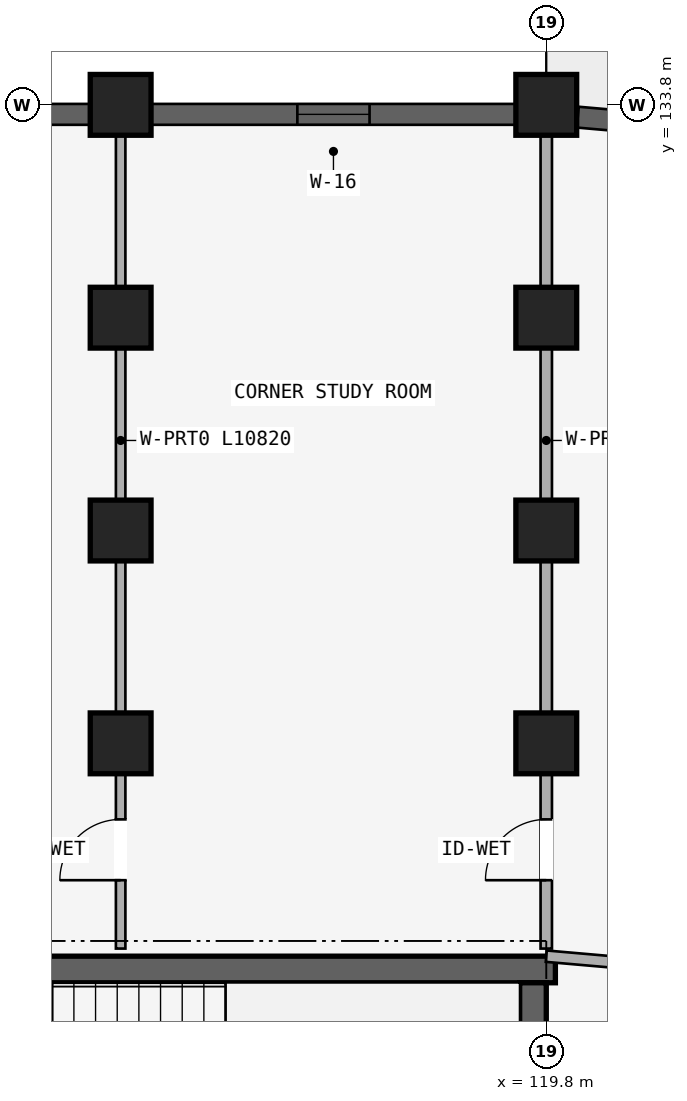
"""IFC4 building model, lengths in metres.
Left out: names, types, materials, properties, quantities, classifications, styles, units other than length and angle.
Written with IfcOpenShell. Run it as: python <this file> out.ifc"""

import sys

from ifc_helpers import new_model, si_unit, direction, frame, frame_2d, origin, origin_2d, place, context, subcontext, project, spatial, rectangle, extrude, element, fill, save


model = new_model("IFC4")
c1 = context("Model", 3, precision=1e-05, world=origin(), true_north=direction((0.0, 1.0)))
c2 = subcontext(c1, "Body", "Model", "MODEL_VIEW")
j1 = project(units=[si_unit("LENGTHUNIT", "METRE"), si_unit("PLANEANGLEUNIT", "RADIAN")], contexts=[c1])
p1 = place(None, origin())
s1 = spatial("IfcSite", under=j1, at=p1, CompositionType="ELEMENT")
p2 = place(p1, origin())
s2 = spatial("IfcBuilding", under=s1, at=p2, CompositionType="ELEMENT")
p3 = place(p2, frame((0.0, 0.0, 8.7)))
s3 = spatial("IfcBuildingStorey", under=s2, at=p3, CompositionType="ELEMENT", Elevation=8.7)
p4 = place(p3, frame((119.92, 122.425, 0.0), z_axis=(0.0, 0.0, 1.0), x_axis=(-1.0, 0.0, 0.0)))
e1 = element("IfcWall", 1, at=p4, inside=s3, PredefinedType="SHEAR", context=c2, shape_type="SweptSolid", body=[
    extrude(rectangle(XDim=8.545, YDim=0.35, at=frame_2d((4.272, 0.0))), origin(), (0.0, 0.0, 1.0), 2.93),
])
p5 = place(p3, frame((119.625, 118.65, 0.0), z_axis=(0.0, 0.0, 1.0), x_axis=(0.0, 1.0, 0.0)))
e2 = element("IfcWall", 2, at=p5, inside=s3, PredefinedType="SHEAR", context=c2, shape_type="SweptSolid", body=[
    extrude(rectangle(XDim=3.6, YDim=0.35, at=frame_2d((1.8, 0.0))), origin(), (0.0, 0.0, 1.0), 2.93),
])
for number, where, z_axis, x_axis in (
    (3, (119.8, 125.4, 0.0), (0.0, 0.0, 1.0), (1.0, 0.0, 0.0)),
    (4, (119.8, 128.2, 0.0), (0.0, 0.0, 1.0), (1.0, 0.0, 0.0)),
    (5, (119.8, 131.0, 0.0), (0.0, 0.0, 1.0), (1.0, 0.0, 0.0)),
    (6, (119.8, 133.8, 0.0), (0.0, 0.0, 1.0), (1.0, 0.0, 0.0)),
    (7, (114.2, 125.4, 0.0), (0.0, 0.0, 1.0), (1.0, 0.0, 0.0)),
    (8, (114.2, 128.2, 0.0), (0.0, 0.0, 1.0), (1.0, 0.0, 0.0)),
    (9, (114.2, 131.0, 0.0), (0.0, 0.0, 1.0), (1.0, 0.0, 0.0)),
    (10, (114.2, 133.8, 0.0), (0.0, 0.0, 1.0), (1.0, 0.0, 0.0)),
):
    element("IfcColumn", number, at=place(p3, frame(where, z_axis=z_axis, x_axis=x_axis)), inside=s3, PredefinedType="COLUMN", context=c2, shape_type="SweptSolid", body=[
        extrude(rectangle(XDim=0.8, YDim=0.8, at=origin_2d()), origin(), (0.0, 0.0, 1.0), 2.93),
    ])
p6 = place(p3, frame((114.2, 122.7, 0.0), z_axis=(0.0, 0.0, 1.0), x_axis=(0.0, 1.0, 0.0)))
e11 = element("IfcWall", 11, at=p6, inside=s3, PredefinedType="PARTITIONING", context=c2, shape_type="SweptSolid", body=[
    extrude(rectangle(XDim=10.82, YDim=0.125, at=frame_2d((5.41, 0.0))), origin(), (0.0, 0.0, 1.0), 2.372),
])
p7 = place(p6, frame((0.899, 0.0, 0.0)))
e12 = element("IfcOpeningElement", 12, at=p7, cuts=e11, PredefinedType="OPENING", context=c2, shape_type="SweptSolid", body=[
    extrude(rectangle(XDim=0.8, YDim=2.1, at=frame_2d((0.4, 1.05))), frame((0.0, 0.073, 0.0), z_axis=(0.0, -1.0, 0.0), x_axis=(1.0, 0.0, 0.0)), (0.0, 0.0, 1.0), 0.145),
])
p8 = place(p3, frame((119.8, 122.7, 0.0), z_axis=(0.0, 0.0, 1.0), x_axis=(0.0, 1.0, 0.0)))
e13 = element("IfcWall", 13, at=p8, inside=s3, PredefinedType="PARTITIONING", context=c2, shape_type="SweptSolid", body=[
    extrude(rectangle(XDim=10.82, YDim=0.15, at=frame_2d((5.41, 0.0))), origin(), (0.0, 0.0, 1.0), 2.372),
])
p9 = place(p8, frame((0.899, 0.0, 0.0)))
e14 = element("IfcOpeningElement", 14, at=p9, cuts=e13, PredefinedType="OPENING", context=c2, shape_type="SweptSolid", body=[
    extrude(rectangle(XDim=0.8, YDim=2.1, at=frame_2d((0.4, 1.05))), frame((0.0, 0.085, 0.0), z_axis=(0.0, -1.0, 0.0), x_axis=(1.0, 0.0, 0.0)), (0.0, 0.0, 1.0), 0.17),
])
p10 = place(p3, frame((119.8, 122.6, 0.0), z_axis=(0.0, 0.0, 1.0), x_axis=(0.996193018494, -0.087174938512, 0.0)))
e15 = element("IfcWall", 15, at=p10, inside=s3, PredefinedType="PLUMBINGWALL", context=c2, shape_type="SweptSolid", body=[
    extrude(rectangle(XDim=6.066, YDim=0.15, at=frame_2d((3.033, 0.0))), origin(), (0.0, 0.0, 1.0), 2.372),
])
p11 = place(p10, frame((2.653, 0.0, 0.0)))
e16 = element("IfcOpeningElement", 16, at=p11, cuts=e15, PredefinedType="OPENING", context=c2, shape_type="SweptSolid", body=[
    extrude(rectangle(XDim=0.76, YDim=2.05, at=frame_2d((0.38, 1.025))), frame((0.0, 0.085, 0.0), z_axis=(0.0, -1.0, 0.0), x_axis=(1.0, 0.0, 0.0)), (0.0, 0.0, 1.0), 0.17),
])
p12 = place(p3, frame((120.215, 133.638, 0.0), z_axis=(0.0, 0.0, 1.0), x_axis=(0.99619608453, -0.08713989423, 0.0)))
e17 = element("IfcWall", 17, at=p12, inside=s3, PredefinedType="STANDARD", context=c2, shape_type="SweptSolid", body=[
    extrude(rectangle(XDim=7.164, YDim=0.275, at=frame_2d((3.582, 0.0))), origin(), (0.0, 0.0, 1.0), 2.472),
])
p13 = place(p12, frame((2.682, 0.0, 0.622)))
e18 = element("IfcOpeningElement", 18, at=p13, cuts=e17, PredefinedType="OPENING", context=c2, shape_type="SweptSolid", body=[
    extrude(rectangle(XDim=1.8, YDim=1.65, at=frame_2d((0.9, 0.825))), frame((0.0, 0.147, 0.0), z_axis=(0.0, -1.0, 0.0), x_axis=(1.0, 0.0, 0.0)), (0.0, 0.0, 1.0), 0.295),
])
p14 = place(p3, frame((119.396, 133.675, 0.0), z_axis=(0.0, 0.0, 1.0), x_axis=(-1.0, 0.0, 0.0)))
e19 = element("IfcWall", 19, at=p14, inside=s3, PredefinedType="STANDARD", context=c2, shape_type="SweptSolid", body=[
    extrude(rectangle(XDim=4.793, YDim=0.275, at=frame_2d((2.396, 0.0))), origin(), (0.0, 0.0, 1.0), 2.472),
])
p15 = place(p14, frame((1.921, 0.0, 0.88)))
e20 = element("IfcOpeningElement", 20, at=p15, cuts=e19, PredefinedType="OPENING", context=c2, shape_type="SweptSolid", body=[
    extrude(rectangle(XDim=0.95, YDim=1.35, at=frame_2d((0.475, 0.675))), frame((0.0, 0.147, 0.0), z_axis=(0.0, -1.0, 0.0), x_axis=(1.0, 0.0, 0.0)), (0.0, 0.0, 1.0), 0.295),
])
p16 = place(p3, frame((113.796, 133.675, 0.0), z_axis=(0.0, 0.0, 1.0), x_axis=(-1.0, 0.0, 0.0)))
e21 = element("IfcWall", 21, at=p16, inside=s3, PredefinedType="STANDARD", context=c2, shape_type="SweptSolid", body=[
    extrude(rectangle(XDim=4.793, YDim=0.275, at=frame_2d((2.396, 0.0))), origin(), (0.0, 0.0, 1.0), 2.472),
])
p17 = place(p16, frame((1.721, 0.0, 0.672)))
e22 = element("IfcOpeningElement", 22, at=p17, cuts=e21, PredefinedType="OPENING", context=c2, shape_type="SweptSolid", body=[
    extrude(rectangle(XDim=1.35, YDim=1.6, at=frame_2d((0.675, 0.8))), frame((0.0, 0.147, 0.0), z_axis=(0.0, -1.0, 0.0), x_axis=(1.0, 0.0, 0.0)), (0.0, 0.0, 1.0), 0.295),
])
p18 = place(p15, origin())
e23 = element("IfcWindow", 23, at=p18, inside=s3, PartitioningType="SINGLE_PANEL", PredefinedType="WINDOW", context=c2, shape_type="SweptSolid", body=[
    extrude(rectangle(XDim=0.95, YDim=1.35, at=frame_2d((0.475, 0.675))), frame((0.0, 0.03, 0.0), z_axis=(0.0, -1.0, 0.0), x_axis=(1.0, 0.0, 0.0)), (0.0, 0.0, 1.0), 0.06),
])
fill(e20, e23)
p19 = place(p7, frame((0.8, 0.0, 0.0), z_axis=(0.0, 0.0, 1.0), x_axis=(-1.0, 0.0, 0.0)))
e24 = element("IfcDoor", 24, at=p19, inside=s3, OperationType="SINGLE_SWING_RIGHT", PredefinedType="DOOR", context=c2, shape_type="SweptSolid", body=[
    extrude(rectangle(XDim=0.8, YDim=2.1, at=frame_2d((0.4, 1.05))), frame((0.0, 0.025, 0.0), z_axis=(0.0, -1.0, 0.0), x_axis=(1.0, 0.0, 0.0)), (0.0, 0.0, 1.0), 0.05),
])
fill(e12, e24)
p20 = place(p9, frame((0.8, 0.0, 0.0), z_axis=(0.0, 0.0, 1.0), x_axis=(-1.0, 0.0, 0.0)))
e25 = element("IfcDoor", 25, at=p20, inside=s3, OperationType="SINGLE_SWING_RIGHT", PredefinedType="DOOR", context=c2, shape_type="SweptSolid", body=[
    extrude(rectangle(XDim=0.8, YDim=2.1, at=frame_2d((0.4, 1.05))), frame((0.0, 0.025, 0.0), z_axis=(0.0, -1.0, 0.0), x_axis=(1.0, 0.0, 0.0)), (0.0, 0.0, 1.0), 0.05),
])
fill(e14, e25)
save(model, sys.argv[1])
